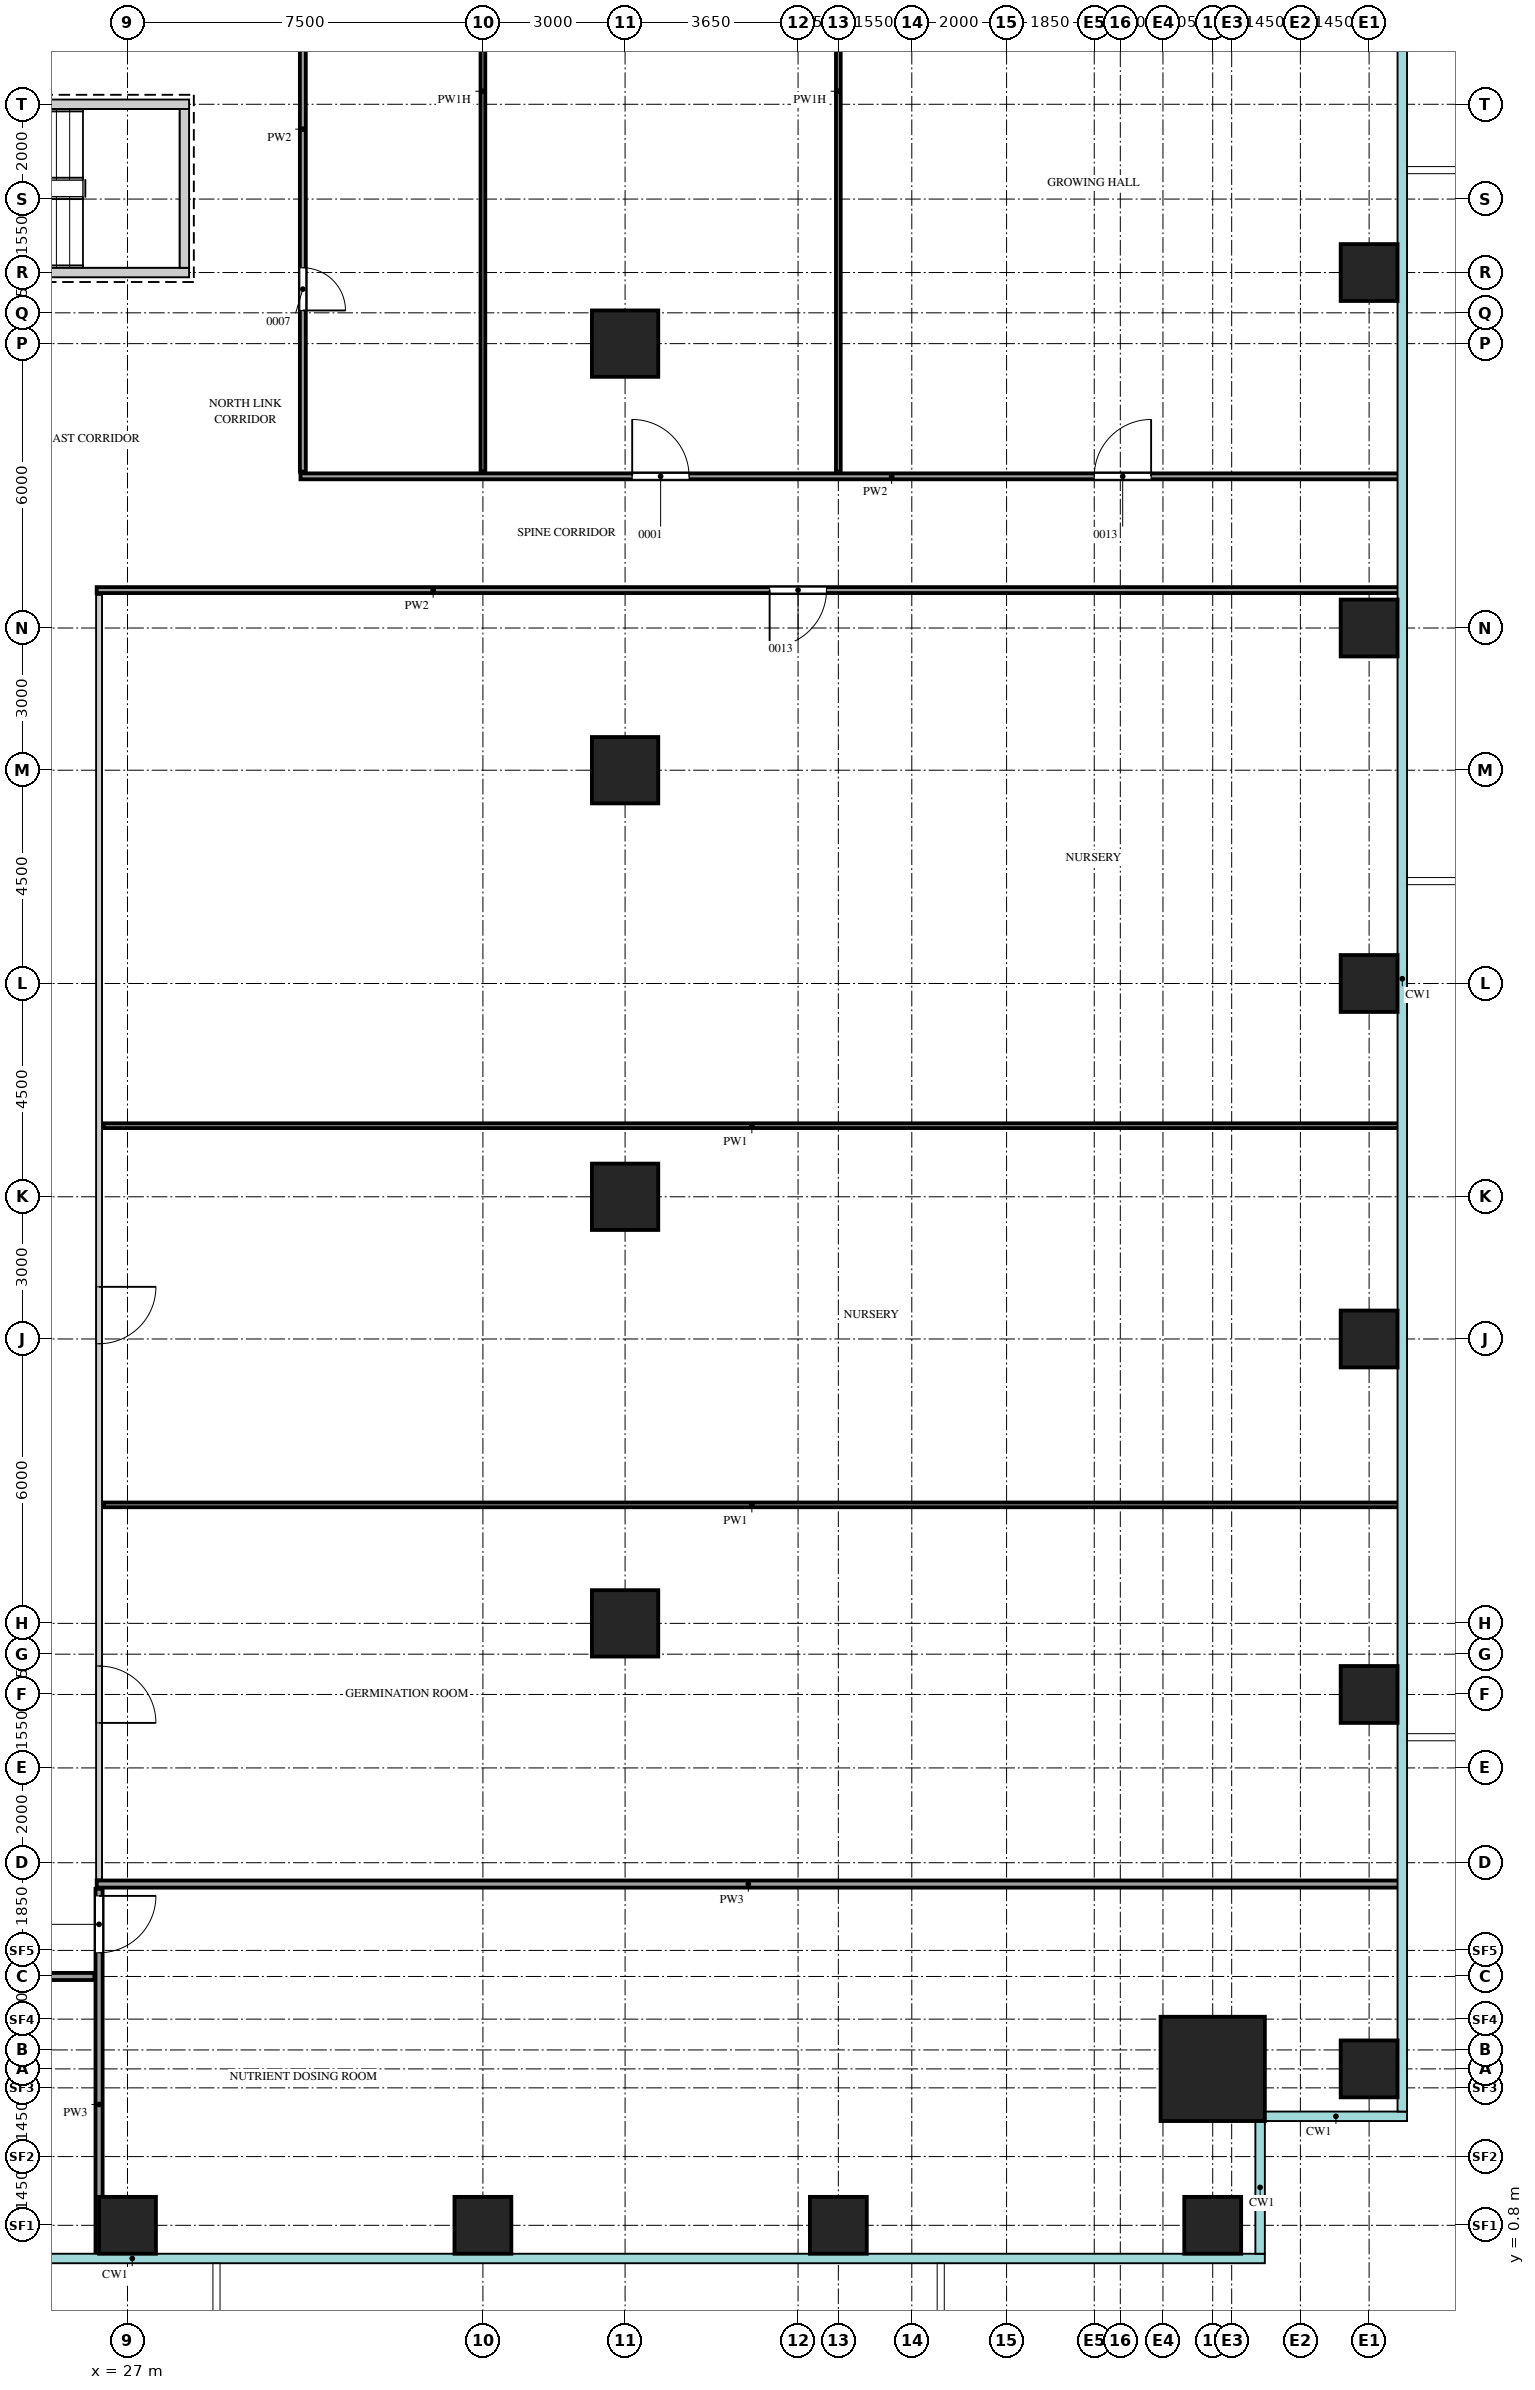
"""IFC4 building model, lengths in metres.
Left out: names, types, materials, properties, quantities, classifications, styles, units other than length and angle.
Written with IfcOpenShell. Run it as: python <this file> out.ifc"""

import sys

from ifc_helpers import new_model, si_unit, direction, frame, frame_2d, origin, origin_2d, place, context, subcontext, project, spatial, rectangle, extrude, source, transform, mapped, element, fill, save


model = new_model("IFC4")
c1 = context("Model", 3, precision=1e-05, world=origin(), true_north=direction((0.0, 1.0)))
c2 = subcontext(c1, "Body", "Model", "MODEL_VIEW")
j1 = project(units=[si_unit("LENGTHUNIT", "METRE"), si_unit("PLANEANGLEUNIT", "RADIAN")], contexts=[c1])
p1 = place(None, origin())
s1 = spatial("IfcSite", under=j1, at=p1, CompositionType="ELEMENT")
p2 = place(p1, origin())
s2 = spatial("IfcBuilding", under=s1, at=p2, CompositionType="ELEMENT")
p3 = place(p2, frame((0.0, 0.0, 55.5)))
s3 = spatial("IfcBuildingStorey", under=s2, at=p3, CompositionType="ELEMENT", Elevation=55.5)
m1 = source(origin(), c2, "Body", "SweptSolid", [
    extrude(rectangle(XDim=7.1, YDim=0.2, at=frame_2d((3.55, 0.0))), origin(), (0.0, 0.0, 1.0), 4.2),
])
p4 = place(p3, frame((21.2, 45.55, 0.0), z_axis=(0.0, 0.0, 1.0), x_axis=(1.0, 0.0, 0.0)))
e1 = element("IfcWall", 1, at=p4, inside=s3, PredefinedType="SHEAR", context=c2, shape_type="MappedRepresentation", body=[
    mapped(m1, transform((0.0, 0.0, 0.0))),
])
m2 = source(origin(), c2, "Body", "SweptSolid", [
    extrude(rectangle(XDim=1.2, YDim=2.1, at=frame_2d((0.6, 1.05))), frame((0.0, 0.11, 0.0), z_axis=(0.0, -1.0, 0.0), x_axis=(1.0, 0.0, 0.0)), (0.0, 0.0, 1.0), 0.22),
])
p5 = place(p4, frame((0.15, 0.0, 0.0)))
e2 = element("IfcOpeningElement", 2, at=p5, cuts=e1, PredefinedType="OPENING", context=c2, shape_type="MappedRepresentation", body=[
    mapped(m2, transform((0.0, 0.0, 0.0))),
])
p6 = place(p3, frame((21.2, 42.0, 0.0), z_axis=(0.0, 0.0, 1.0), x_axis=(1.0, 0.0, 0.0)))
e3 = element("IfcWall", 3, at=p6, inside=s3, PredefinedType="SHEAR", context=c2, shape_type="MappedRepresentation", body=[
    mapped(m1, transform((0.0, 0.0, 0.0))),
])
m3 = source(origin(), c2, "Body", "SweptSolid", [
    extrude(rectangle(XDim=3.35, YDim=0.2, at=frame_2d((1.675, 0.0))), origin(), (0.0, 0.0, 1.0), 4.2),
])
p7 = place(p3, frame((28.2, 42.1, 0.0), z_axis=(0.0, 0.0, 1.0), x_axis=(0.0, 1.0, 0.0)))
e4 = element("IfcWall", 4, at=p7, inside=s3, PredefinedType="SHEAR", context=c2, shape_type="MappedRepresentation", body=[
    mapped(m3, transform((0.0, 0.0, 0.0))),
])
m4 = source(origin(), c2, "Body", "SweptSolid", [
    extrude(rectangle(XDim=2.2, YDim=2.2, at=origin_2d()), origin(), (0.0, 0.0, 1.0), 4.5),
])
p8 = place(p3, frame((49.9, 4.1, 0.0), z_axis=(0.0, 0.0, 1.0), x_axis=(1.0, 0.0, 0.0)))
e5 = element("IfcColumn", 5, at=p8, inside=s3, PredefinedType="COLUMN", context=c2, shape_type="MappedRepresentation", body=[
    mapped(m4, transform((0.0, 0.0, 0.0))),
])
m5 = source(origin(), c2, "Body", "SweptSolid", [
    extrude(rectangle(XDim=1.2, YDim=1.2, at=origin_2d()), origin(), (0.0, 0.0, 1.0), 4.2),
])
for number, where, z_axis, x_axis in (
    (6, (27.0, 0.8, 0.0), (0.0, 0.0, 1.0), (1.0, 0.0, 0.0)),
    (7, (34.5, 0.8, 0.0), (0.0, 0.0, 1.0), (1.0, 0.0, 0.0)),
    (8, (42.0, 0.8, 0.0), (0.0, 0.0, 1.0), (1.0, 0.0, 0.0)),
    (9, (49.9, 0.8, 0.0), (0.0, 0.0, 1.0), (1.0, 0.0, 0.0)),
    (10, (53.2, 4.1, 0.0), (0.0, 0.0, 1.0), (1.0, 0.0, 0.0)),
    (11, (53.2, 12.0, 0.0), (0.0, 0.0, 1.0), (1.0, 0.0, 0.0)),
    (12, (53.2, 19.5, 0.0), (0.0, 0.0, 1.0), (1.0, 0.0, 0.0)),
    (13, (53.2, 27.0, 0.0), (0.0, 0.0, 1.0), (1.0, 0.0, 0.0)),
    (14, (53.2, 34.5, 0.0), (0.0, 0.0, 1.0), (1.0, 0.0, 0.0)),
    (15, (53.2, 42.0, 0.0), (0.0, 0.0, 1.0), (1.0, 0.0, 0.0)),
):
    element("IfcColumn", number, at=place(p3, frame(where, z_axis=z_axis, x_axis=x_axis)), inside=s3, PredefinedType="COLUMN", context=c2, shape_type="MappedRepresentation", body=[
        mapped(m5, transform((0.0, 0.0, 0.0))),
    ])
m6 = source(origin(), c2, "Body", "SweptSolid", [
    extrude(rectangle(XDim=1.4, YDim=1.4, at=origin_2d()), origin(), (0.0, 0.0, 1.0), 4.2),
])
for number, where, z_axis, x_axis in (
    (16, (37.5, 13.5, 0.0), (0.0, 0.0, 1.0), (1.0, 0.0, 0.0)),
    (17, (37.5, 22.5, 0.0), (0.0, 0.0, 1.0), (1.0, 0.0, 0.0)),
    (18, (37.5, 31.5, 0.0), (0.0, 0.0, 1.0), (1.0, 0.0, 0.0)),
    (19, (37.5, 40.5, 0.0), (0.0, 0.0, 1.0), (1.0, 0.0, 0.0)),
):
    element("IfcColumn", number, at=place(p3, frame(where, z_axis=z_axis, x_axis=x_axis)), inside=s3, PredefinedType="COLUMN", context=c2, shape_type="MappedRepresentation", body=[
        mapped(m6, transform((0.0, 0.0, 0.0))),
    ])
m7 = source(origin(), c2, "Body", "SweptSolid", [
    extrude(rectangle(XDim=7.75, YDim=0.15, at=frame_2d((3.875, 0.0))), origin(), (0.0, 0.0, 1.0), 4.3),
])
p9 = place(p3, frame((26.4, 0.15, 0.0), z_axis=(0.0, 0.0, 1.0), x_axis=(0.0, 1.0, 0.0)))
e20 = element("IfcWall", 20, at=p9, inside=s3, PredefinedType="PARTITIONING", context=c2, shape_type="MappedRepresentation", body=[
    mapped(m7, transform((0.0, 0.0, 0.0))),
])
m8 = source(origin(), c2, "Body", "SweptSolid", [
    extrude(rectangle(XDim=1.2, YDim=2.1, at=frame_2d((0.6, 1.05))), frame((0.0, 0.085, 0.0), z_axis=(0.0, -1.0, 0.0), x_axis=(1.0, 0.0, 0.0)), (0.0, 0.0, 1.0), 0.17),
])
p10 = place(p9, frame((6.4, 0.0, 0.0)))
e21 = element("IfcOpeningElement", 21, at=p10, cuts=e20, PredefinedType="OPENING", context=c2, shape_type="MappedRepresentation", body=[
    mapped(m8, transform((0.0, 0.0, 0.0))),
])
m9 = source(origin(), c2, "Body", "SweptSolid", [
    extrude(rectangle(XDim=22.15, YDim=0.15, at=frame_2d((11.075, 0.0))), origin(), (0.0, 0.0, 1.0), 4.3),
])
p11 = place(p3, frame((4.15, 6.05, 0.0), z_axis=(0.0, 0.0, 1.0), x_axis=(1.0, 0.0, 0.0)))
e22 = element("IfcWall", 22, at=p11, inside=s3, PredefinedType="PARTITIONING", context=c2, shape_type="MappedRepresentation", body=[
    mapped(m9, transform((0.0, 0.0, 0.0))),
])
p12 = place(p11, frame((9.2, 0.0, 0.0)))
e23 = element("IfcOpeningElement", 23, at=p12, cuts=e22, PredefinedType="OPENING", context=c2, shape_type="MappedRepresentation", body=[
    mapped(m8, transform((0.0, 0.0, 0.0))),
])
m10 = source(origin(), c2, "Body", "SweptSolid", [
    extrude(rectangle(XDim=27.5, YDim=0.15, at=frame_2d((13.75, 0.0))), origin(), (0.0, 0.0, 1.0), 4.3),
])
p13 = place(p3, frame((26.35, 8.0, 0.0), z_axis=(0.0, 0.0, 1.0), x_axis=(1.0, 0.0, 0.0)))
e24 = element("IfcWall", 24, at=p13, inside=s3, PredefinedType="PARTITIONING", context=c2, shape_type="MappedRepresentation", body=[
    mapped(m10, transform((0.0, 0.0, 0.0))),
])
m11 = source(origin(), c2, "Body", "SweptSolid", [
    extrude(rectangle(XDim=27.1, YDim=0.125, at=frame_2d((13.55, 0.0))), origin(), (0.0, 0.0, 1.0), 4.3),
])
p14 = place(p3, frame((26.4, 8.1, 0.0), z_axis=(0.0, 0.0, 1.0), x_axis=(0.0, 1.0, 0.0)))
e25 = element("IfcWall", 25, at=p14, inside=s3, PredefinedType="PARTITIONING", context=c2, shape_type="MappedRepresentation", body=[
    mapped(m11, transform((0.0, 0.0, 0.0))),
])
m12 = source(origin(), c2, "Body", "SweptSolid", [
    extrude(rectangle(XDim=1.2, YDim=2.1, at=frame_2d((0.6, 1.05))), frame((0.0, 0.073, 0.0), z_axis=(0.0, -1.0, 0.0), x_axis=(1.0, 0.0, 0.0)), (0.0, 0.0, 1.0), 0.145),
])
p15 = place(p14, frame((3.3, 0.0, 0.0)))
e26 = element("IfcOpeningElement", 26, at=p15, cuts=e25, PredefinedType="OPENING", context=c2, shape_type="MappedRepresentation", body=[
    mapped(m12, transform((0.0, 0.0, 0.0))),
])
p16 = place(p14, frame((11.3, 0.0, 0.0)))
e27 = element("IfcOpeningElement", 27, at=p16, cuts=e25, PredefinedType="OPENING", context=c2, shape_type="MappedRepresentation", body=[
    mapped(m12, transform((0.0, 0.0, 0.0))),
])
m13 = source(origin(), c2, "Body", "SweptSolid", [
    extrude(rectangle(XDim=27.35, YDim=0.1, at=frame_2d((13.675, 0.0))), origin(), (0.0, 0.0, 1.0), 4.3),
])
for number, where, z_axis, x_axis in (
    (28, (26.5, 16.0, 0.0), (0.0, 0.0, 1.0), (1.0, 0.0, 0.0)),
    (29, (26.5, 24.0, 0.0), (0.0, 0.0, 1.0), (1.0, 0.0, 0.0)),
):
    element("IfcWall", number, at=place(p3, frame(where, z_axis=z_axis, x_axis=x_axis)), inside=s3, PredefinedType="PARTITIONING", context=c2, shape_type="MappedRepresentation", body=[
        mapped(m13, transform((0.0, 0.0, 0.0))),
    ])
m14 = source(origin(), c2, "Body", "SweptSolid", [
    extrude(rectangle(XDim=27.5, YDim=0.125, at=frame_2d((13.75, 0.0))), origin(), (0.0, 0.0, 1.0), 4.3),
])
p17 = place(p3, frame((26.35, 35.3, 0.0), z_axis=(0.0, 0.0, 1.0), x_axis=(1.0, 0.0, 0.0)))
e30 = element("IfcWall", 30, at=p17, inside=s3, PredefinedType="PARTITIONING", context=c2, shape_type="MappedRepresentation", body=[
    mapped(m14, transform((0.0, 0.0, 0.0))),
])
p18 = place(p17, frame((14.2, 0.0, 0.0)))
e31 = element("IfcOpeningElement", 31, at=p18, cuts=e30, PredefinedType="OPENING", context=c2, shape_type="MappedRepresentation", body=[
    mapped(m12, transform((0.0, 0.0, 0.0))),
])
m15 = source(origin(), c2, "Body", "SweptSolid", [
    extrude(rectangle(XDim=23.2, YDim=0.125, at=frame_2d((11.6, 0.0))), origin(), (0.0, 0.0, 1.0), 4.3),
])
p19 = place(p3, frame((30.65, 37.7, 0.0), z_axis=(0.0, 0.0, 1.0), x_axis=(1.0, 0.0, 0.0)))
e32 = element("IfcWall", 32, at=p19, inside=s3, PredefinedType="PARTITIONING", context=c2, shape_type="MappedRepresentation", body=[
    mapped(m15, transform((0.0, 0.0, 0.0))),
])
p20 = place(p19, frame((7.0, 0.0, 0.0)))
e33 = element("IfcOpeningElement", 33, at=p20, cuts=e32, PredefinedType="OPENING", context=c2, shape_type="MappedRepresentation", body=[
    mapped(m12, transform((0.0, 0.0, 0.0))),
])
p21 = place(p19, frame((16.75, 0.0, 0.0)))
e34 = element("IfcOpeningElement", 34, at=p21, cuts=e32, PredefinedType="OPENING", context=c2, shape_type="MappedRepresentation", body=[
    mapped(m12, transform((0.0, 0.0, 0.0))),
])
m16 = source(origin(), c2, "Body", "SweptSolid", [
    extrude(rectangle(XDim=10.15, YDim=0.125, at=frame_2d((5.075, 0.0))), origin(), (0.0, 0.0, 1.0), 4.3),
])
p22 = place(p3, frame((30.7, 37.8, 0.0), z_axis=(0.0, 0.0, 1.0), x_axis=(0.0, 1.0, 0.0)))
e35 = element("IfcWall", 35, at=p22, inside=s3, PredefinedType="PARTITIONING", context=c2, shape_type="MappedRepresentation", body=[
    mapped(m16, transform((0.0, 0.0, 0.0))),
])
m17 = source(origin(), c2, "Body", "SweptSolid", [
    extrude(rectangle(XDim=0.9, YDim=2.1, at=frame_2d((0.45, 1.05))), frame((0.0, 0.073, 0.0), z_axis=(0.0, -1.0, 0.0), x_axis=(1.0, 0.0, 0.0)), (0.0, 0.0, 1.0), 0.145),
])
p23 = place(p22, frame((3.4, 0.0, 0.0)))
e36 = element("IfcOpeningElement", 36, at=p23, cuts=e35, PredefinedType="OPENING", context=c2, shape_type="MappedRepresentation", body=[
    mapped(m17, transform((0.0, 0.0, 0.0))),
])
m18 = source(origin(), c2, "Body", "SweptSolid", [
    extrude(rectangle(XDim=16.05, YDim=0.1, at=frame_2d((8.025, 0.0))), origin(), (0.0, 0.0, 1.0), 3.7),
])
for number, where, z_axis, x_axis in (
    (37, (34.5, 37.8, 0.0), (0.0, 0.0, 1.0), (0.0, 1.0, 0.0)),
    (38, (42.0, 37.8, 0.0), (0.0, 0.0, 1.0), (0.0, 1.0, 0.0)),
):
    element("IfcWall", number, at=place(p3, frame(where, z_axis=z_axis, x_axis=x_axis)), inside=s3, PredefinedType="PARTITIONING", context=c2, shape_type="MappedRepresentation", body=[
        mapped(m18, transform((0.0, 0.0, 0.0))),
    ])
m19 = source(origin(), c2, "Body", "SweptSolid", [
    extrude(rectangle(XDim=1.2, YDim=2.1, at=frame_2d((0.6, 1.05))), frame((0.0, 0.025, 0.0), z_axis=(0.0, -1.0, 0.0), x_axis=(1.0, 0.0, 0.0)), (0.0, 0.0, 1.0), 0.05),
])
p24 = place(p10, origin())
e39 = element("IfcDoor", 39, at=p24, inside=s3, OperationType="SINGLE_SWING_RIGHT", PredefinedType="DOOR", context=c2, shape_type="MappedRepresentation", body=[
    mapped(m19, transform((0.0, 0.0, 0.0))),
])
fill(e21, e39)
p25 = place(p15, origin())
e40 = element("IfcDoor", 40, at=p25, inside=s3, OperationType="SINGLE_SWING_LEFT", PredefinedType="DOOR", context=c2, shape_type="MappedRepresentation", body=[
    mapped(m19, transform((0.0, 0.0, 0.0))),
])
fill(e26, e40)
p26 = place(p16, origin())
e41 = element("IfcDoor", 41, at=p26, inside=s3, OperationType="SINGLE_SWING_RIGHT", PredefinedType="DOOR", context=c2, shape_type="MappedRepresentation", body=[
    mapped(m19, transform((0.0, 0.0, 0.0))),
])
fill(e27, e41)
p27 = place(p18, origin())
e42 = element("IfcDoor", 42, at=p27, inside=s3, OperationType="SINGLE_SWING_LEFT", PredefinedType="DOOR", context=c2, shape_type="MappedRepresentation", body=[
    mapped(m19, transform((0.0, 0.0, 0.0))),
])
fill(e31, e42)
m20 = source(origin(), c2, "Body", "SweptSolid", [
    extrude(rectangle(XDim=0.9, YDim=2.1, at=frame_2d((0.45, 1.05))), frame((0.0, 0.025, 0.0), z_axis=(0.0, -1.0, 0.0), x_axis=(1.0, 0.0, 0.0)), (0.0, 0.0, 1.0), 0.05),
])
p28 = place(p23, origin())
e43 = element("IfcDoor", 43, at=p28, inside=s3, OperationType="SINGLE_SWING_LEFT", PredefinedType="DOOR", context=c2, shape_type="MappedRepresentation", body=[
    mapped(m20, transform((0.0, 0.0, 0.0))),
])
fill(e36, e43)
p29 = place(p20, origin())
e44 = element("IfcDoor", 44, at=p29, inside=s3, OperationType="SINGLE_SWING_RIGHT", PredefinedType="DOOR", context=c2, shape_type="MappedRepresentation", body=[
    mapped(m19, transform((0.0, 0.0, 0.0))),
])
fill(e33, e44)
p30 = place(p21, origin())
e45 = element("IfcDoor", 45, at=p30, inside=s3, OperationType="SINGLE_SWING_LEFT", PredefinedType="DOOR", context=c2, shape_type="MappedRepresentation", body=[
    mapped(m19, transform((0.0, 0.0, 0.0))),
])
fill(e34, e45)
save(model, sys.argv[1])
